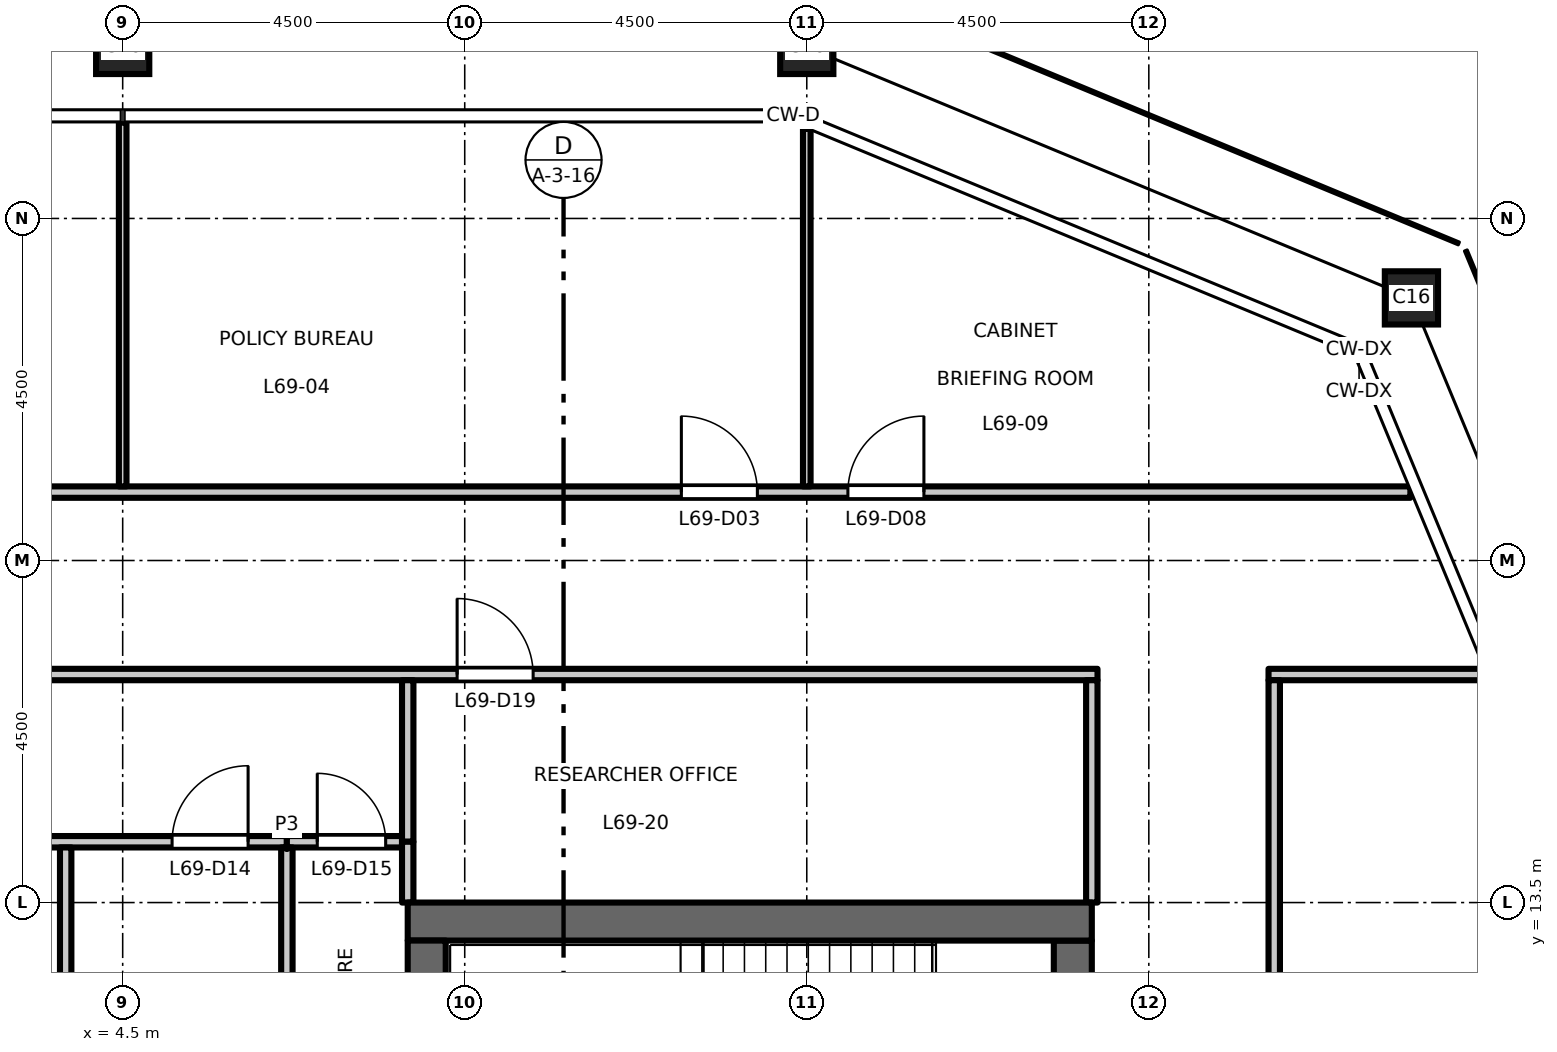
"""IFC4 building model, lengths in metres.
Left out: names, types, materials, properties, quantities, classifications, styles, units other than length and angle.
Written with IfcOpenShell. Run it as: python <this file> out.ifc"""

import sys

from ifc_helpers import new_model, si_unit, direction, frame, frame_2d, origin, origin_2d, place, context, subcontext, project, spatial, rectangle, hollow_rectangle, extrude, element, fill, save


model = new_model("IFC4")
c1 = context("Model", 3, precision=1e-05, world=origin(), true_north=direction((0.0, 1.0)))
c2 = subcontext(c1, "Body", "Model", "MODEL_VIEW")
j1 = project(units=[si_unit("LENGTHUNIT", "METRE"), si_unit("PLANEANGLEUNIT", "RADIAN")], contexts=[c1])
p1 = place(None, origin())
s1 = spatial("IfcSite", under=j1, at=p1, CompositionType="ELEMENT")
p2 = place(p1, origin())
s2 = spatial("IfcBuilding", under=s1, at=p2, CompositionType="ELEMENT")
p3 = place(p2, frame((0.0, 0.0, 321.2)))
s3 = spatial("IfcBuildingStorey", under=s2, at=p3, CompositionType="ELEMENT", Elevation=321.2)
for number, where, z_axis, x_axis in (
    (1, (21.455, 21.455, 0.0), (0.0, 0.0, 1.0), (1.0, 0.0, 0.0)),
    (2, (13.5, 24.75, 0.0), (0.0, 0.0, 1.0), (1.0, 0.0, 0.0)),
    (3, (4.5, 24.75, 0.0), (0.0, 0.0, 1.0), (1.0, 0.0, 0.0)),
):
    element("IfcColumn", number, at=place(p3, frame(where, z_axis=z_axis, x_axis=x_axis)), inside=s3, PredefinedType="COLUMN", context=c2, shape_type="SweptSolid", body=[
        extrude(hollow_rectangle(XDim=0.7, YDim=0.7, WallThickness=0.036, at=origin_2d()), origin(), (0.0, 0.0, 1.0), 4.5),
    ])
p4 = place(p3, frame((17.0, -13.0, 0.0), z_axis=(0.0, 0.0, 1.0), x_axis=(0.0, 1.0, 0.0)))
e4 = element("IfcWall", 4, at=p4, inside=s3, PredefinedType="SHEAR", context=c2, shape_type="SweptSolid", body=[
    extrude(rectangle(XDim=26.0, YDim=0.5, at=frame_2d((13.0, 0.0))), origin(), (0.0, 0.0, 1.0), 4.35),
])
p5 = place(p4, frame((16.825, 0.0, 0.0)))
e5 = element("IfcOpeningElement", 5, at=p5, cuts=e4, PredefinedType="OPENING", context=c2, shape_type="SweptSolid", body=[
    extrude(rectangle(XDim=1.8, YDim=2.1, at=frame_2d((0.9, 1.05))), frame((0.0, 0.26, 0.0), z_axis=(0.0, -1.0, 0.0), x_axis=(1.0, 0.0, 0.0)), (0.0, 0.0, 1.0), 0.52),
])
p6 = place(p4, frame((7.375, 0.0, 0.0)))
e6 = element("IfcOpeningElement", 6, at=p6, cuts=e4, PredefinedType="OPENING", context=c2, shape_type="SweptSolid", body=[
    extrude(rectangle(XDim=1.8, YDim=2.1, at=frame_2d((0.9, 1.05))), frame((0.0, 0.26, 0.0), z_axis=(0.0, -1.0, 0.0), x_axis=(1.0, 0.0, 0.0)), (0.0, 0.0, 1.0), 0.52),
])
p7 = place(p3, frame((8.25, 13.25, 0.0), z_axis=(0.0, 0.0, 1.0), x_axis=(1.0, 0.0, 0.0)))
e7 = element("IfcWall", 7, at=p7, inside=s3, PredefinedType="SHEAR", context=c2, shape_type="SweptSolid", body=[
    extrude(rectangle(XDim=9.0, YDim=0.5, at=frame_2d((4.5, 0.0))), origin(), (0.0, 0.0, 1.0), 4.35),
])
p8 = place(p3, frame((8.5, -13.0, 0.0), z_axis=(0.0, 0.0, 1.0), x_axis=(0.0, 1.0, 0.0)))
e8 = element("IfcWall", 8, at=p8, inside=s3, PredefinedType="SHEAR", context=c2, shape_type="SweptSolid", body=[
    extrude(rectangle(XDim=26.0, YDim=0.5, at=frame_2d((13.0, 0.0))), origin(), (0.0, 0.0, 1.0), 4.35),
])
p9 = place(p3, frame((-8.175, 14.3, 0.0), z_axis=(0.0, 0.0, 1.0), x_axis=(1.0, 0.0, 0.0)))
e9 = element("IfcWall", 9, at=p9, inside=s3, PredefinedType="PARTITIONING", context=c2, shape_type="SweptSolid", body=[
    extrude(rectangle(XDim=14.835, YDim=0.15, at=frame_2d((7.417, 0.0))), origin(), (0.0, 0.0, 1.0), 4.35),
])
p10 = place(p9, frame((4.325, 0.0, 0.0)))
e10 = element("IfcOpeningElement", 10, at=p10, cuts=e9, PredefinedType="OPENING", context=c2, shape_type="SweptSolid", body=[
    extrude(rectangle(XDim=1.0, YDim=2.1, at=frame_2d((0.5, 1.05))), frame((0.0, 0.085, 0.0), z_axis=(0.0, -1.0, 0.0), x_axis=(1.0, 0.0, 0.0)), (0.0, 0.0, 1.0), 0.17),
])
p11 = place(p9, frame((6.575, 0.0, 0.0)))
e11 = element("IfcOpeningElement", 11, at=p11, cuts=e9, PredefinedType="OPENING", context=c2, shape_type="SweptSolid", body=[
    extrude(rectangle(XDim=1.0, YDim=2.1, at=frame_2d((0.5, 1.05))), frame((0.0, 0.085, 0.0), z_axis=(0.0, -1.0, 0.0), x_axis=(1.0, 0.0, 0.0)), (0.0, 0.0, 1.0), 0.17),
])
p12 = place(p9, frame((13.325, 0.0, 0.0)))
e12 = element("IfcOpeningElement", 12, at=p12, cuts=e9, PredefinedType="OPENING", context=c2, shape_type="SweptSolid", body=[
    extrude(rectangle(XDim=1.0, YDim=2.1, at=frame_2d((0.5, 1.05))), frame((0.0, 0.085, 0.0), z_axis=(0.0, -1.0, 0.0), x_axis=(1.0, 0.0, 0.0)), (0.0, 0.0, 1.0), 0.17),
])
p13 = place(p3, frame((6.66, 14.3, 0.0), z_axis=(0.0, 0.0, 1.0), x_axis=(1.0, 0.0, 0.0)))
e13 = element("IfcWall", 13, at=p13, inside=s3, PredefinedType="PARTITIONING", context=c2, shape_type="SweptSolid", body=[
    extrude(rectangle(XDim=1.515, YDim=0.15, at=frame_2d((0.758, 0.0))), origin(), (0.0, 0.0, 1.0), 4.35),
])
p14 = place(p13, frame((0.4, 0.0, 0.0)))
e14 = element("IfcOpeningElement", 14, at=p14, cuts=e13, PredefinedType="OPENING", context=c2, shape_type="SweptSolid", body=[
    extrude(rectangle(XDim=0.9, YDim=2.1, at=frame_2d((0.45, 1.05))), frame((0.0, 0.085, 0.0), z_axis=(0.0, -1.0, 0.0), x_axis=(1.0, 0.0, 0.0)), (0.0, 0.0, 1.0), 0.17),
])
p15 = place(p3, frame((-17.325, 16.5, 0.0), z_axis=(0.0, 0.0, 1.0), x_axis=(1.0, 0.0, 0.0)))
e15 = element("IfcWall", 15, at=p15, inside=s3, PredefinedType="PARTITIONING", context=c2, shape_type="SweptSolid", body=[
    extrude(rectangle(XDim=34.65, YDim=0.15, at=frame_2d((17.325, 0.0))), origin(), (0.0, 0.0, 1.0), 4.35),
])
p16 = place(p15, frame((9.725, 0.0, 0.0)))
e16 = element("IfcOpeningElement", 16, at=p16, cuts=e15, PredefinedType="OPENING", context=c2, shape_type="SweptSolid", body=[
    extrude(rectangle(XDim=1.0, YDim=2.1, at=frame_2d((0.5, 1.05))), frame((0.0, 0.085, 0.0), z_axis=(0.0, -1.0, 0.0), x_axis=(1.0, 0.0, 0.0)), (0.0, 0.0, 1.0), 0.17),
])
p17 = place(p15, frame((7.475, 0.0, 0.0)))
e17 = element("IfcOpeningElement", 17, at=p17, cuts=e15, PredefinedType="OPENING", context=c2, shape_type="SweptSolid", body=[
    extrude(rectangle(XDim=1.0, YDim=2.1, at=frame_2d((0.5, 1.05))), frame((0.0, 0.085, 0.0), z_axis=(0.0, -1.0, 0.0), x_axis=(1.0, 0.0, 0.0)), (0.0, 0.0, 1.0), 0.17),
])
p18 = place(p15, frame((26.225, 0.0, 0.0)))
e18 = element("IfcOpeningElement", 18, at=p18, cuts=e15, PredefinedType="OPENING", context=c2, shape_type="SweptSolid", body=[
    extrude(rectangle(XDim=1.0, YDim=2.1, at=frame_2d((0.5, 1.05))), frame((0.0, 0.085, 0.0), z_axis=(0.0, -1.0, 0.0), x_axis=(1.0, 0.0, 0.0)), (0.0, 0.0, 1.0), 0.17),
])
p19 = place(p3, frame((19.575, 16.5, 0.0), z_axis=(0.0, 0.0, 1.0), x_axis=(1.0, 0.0, 0.0)))
e19 = element("IfcWall", 19, at=p19, inside=s3, PredefinedType="PARTITIONING", context=c2, shape_type="SweptSolid", body=[
    extrude(rectangle(XDim=2.861, YDim=0.15, at=frame_2d((1.431, 0.0))), origin(), (0.0, 0.0, 1.0), 4.35),
])
p20 = place(p3, frame((-21.441, 18.9, 0.0), z_axis=(0.0, 0.0, 1.0), x_axis=(1.0, 0.0, 0.0)))
e20 = element("IfcWall", 20, at=p20, inside=s3, PredefinedType="PARTITIONING", context=c2, shape_type="SweptSolid", body=[
    extrude(rectangle(XDim=42.882, YDim=0.15, at=frame_2d((21.441, 0.0))), origin(), (0.0, 0.0, 1.0), 4.35),
])
p21 = place(p20, frame((15.291, 0.0, 0.0)))
e21 = element("IfcOpeningElement", 21, at=p21, cuts=e20, PredefinedType="OPENING", context=c2, shape_type="SweptSolid", body=[
    extrude(rectangle(XDim=1.0, YDim=2.1, at=frame_2d((0.5, 1.05))), frame((0.0, 0.085, 0.0), z_axis=(0.0, -1.0, 0.0), x_axis=(1.0, 0.0, 0.0)), (0.0, 0.0, 1.0), 0.17),
])
p22 = place(p20, frame((17.541, 0.0, 0.0)))
e22 = element("IfcOpeningElement", 22, at=p22, cuts=e20, PredefinedType="OPENING", context=c2, shape_type="SweptSolid", body=[
    extrude(rectangle(XDim=1.0, YDim=2.1, at=frame_2d((0.5, 1.05))), frame((0.0, 0.085, 0.0), z_axis=(0.0, -1.0, 0.0), x_axis=(1.0, 0.0, 0.0)), (0.0, 0.0, 1.0), 0.17),
])
p23 = place(p20, frame((33.291, 0.0, 0.0)))
e23 = element("IfcOpeningElement", 23, at=p23, cuts=e20, PredefinedType="OPENING", context=c2, shape_type="SweptSolid", body=[
    extrude(rectangle(XDim=1.0, YDim=2.1, at=frame_2d((0.5, 1.05))), frame((0.0, 0.085, 0.0), z_axis=(0.0, -1.0, 0.0), x_axis=(1.0, 0.0, 0.0)), (0.0, 0.0, 1.0), 0.17),
])
p24 = place(p20, frame((6.291, 0.0, 0.0)))
e24 = element("IfcOpeningElement", 24, at=p24, cuts=e20, PredefinedType="OPENING", context=c2, shape_type="SweptSolid", body=[
    extrude(rectangle(XDim=1.0, YDim=2.1, at=frame_2d((0.5, 1.05))), frame((0.0, 0.085, 0.0), z_axis=(0.0, -1.0, 0.0), x_axis=(1.0, 0.0, 0.0)), (0.0, 0.0, 1.0), 0.17),
])
p25 = place(p20, frame((35.482, 0.0, 0.0)))
e25 = element("IfcOpeningElement", 25, at=p25, cuts=e20, PredefinedType="OPENING", context=c2, shape_type="SweptSolid", body=[
    extrude(rectangle(XDim=1.0, YDim=2.1, at=frame_2d((0.5, 1.05))), frame((0.0, 0.085, 0.0), z_axis=(0.0, -1.0, 0.0), x_axis=(1.0, 0.0, 0.0)), (0.0, 0.0, 1.0), 0.17),
])
p26 = place(p3, frame((3.75, 8.37, 0.0), z_axis=(0.0, 0.0, 1.0), x_axis=(0.0, 1.0, 0.0)))
e26 = element("IfcWall", 26, at=p26, inside=s3, PredefinedType="PARTITIONING", context=c2, shape_type="SweptSolid", body=[
    extrude(rectangle(XDim=5.855, YDim=0.15, at=frame_2d((2.927, 0.0))), origin(), (0.0, 0.0, 1.0), 4.35),
])
p27 = place(p3, frame((4.5, 18.975, 0.0), z_axis=(0.0, 0.0, 1.0), x_axis=(0.0, 1.0, 0.0)))
e27 = element("IfcWall", 27, at=p27, inside=s3, PredefinedType="PARTITIONING", context=c2, shape_type="SweptSolid", body=[
    extrude(rectangle(XDim=4.785, YDim=0.1, at=frame_2d((2.393, 0.0))), origin(), (0.0, 0.0, 1.0), 3.65),
])
p28 = place(p3, frame((6.66, 8.127, 0.0), z_axis=(0.0, 0.0, 1.0), x_axis=(0.0, 1.0, 0.0)))
e28 = element("IfcWall", 28, at=p28, inside=s3, PredefinedType="PARTITIONING", context=c2, shape_type="SweptSolid", body=[
    extrude(rectangle(XDim=6.098, YDim=0.15, at=frame_2d((3.049, 0.0))), origin(), (0.0, 0.0, 1.0), 4.35),
])
p29 = place(p3, frame((8.25, 14.3, 0.0), z_axis=(0.0, 0.0, 1.0), x_axis=(0.0, 1.0, 0.0)))
e29 = element("IfcWall", 29, at=p29, inside=s3, PredefinedType="PARTITIONING", context=c2, shape_type="SweptSolid", body=[
    extrude(rectangle(XDim=2.125, YDim=0.15, at=frame_2d((1.062, 0.0))), origin(), (0.0, 0.0, 1.0), 4.35),
])
p30 = place(p3, frame((8.25, 13.5, 0.0), z_axis=(0.0, 0.0, 1.0), x_axis=(0.0, 1.0, 0.0)))
e30 = element("IfcWall", 30, at=p30, inside=s3, PredefinedType="PARTITIONING", context=c2, shape_type="SweptSolid", body=[
    extrude(rectangle(XDim=0.8, YDim=0.15, at=frame_2d((0.4, 0.0))), origin(), (0.0, 0.0, 1.0), 4.35),
])
p31 = place(p3, frame((13.5, 18.975, 0.0), z_axis=(0.0, 0.0, 1.0), x_axis=(0.0, 1.0, 0.0)))
e31 = element("IfcWall", 31, at=p31, inside=s3, PredefinedType="PARTITIONING", context=c2, shape_type="SweptSolid", body=[
    extrude(rectangle(XDim=4.703, YDim=0.1, at=frame_2d((2.352, 0.0))), origin(), (0.0, 0.0, 1.0), 3.75),
])
p32 = place(p3, frame((17.25, 13.5, 0.0), z_axis=(0.0, 0.0, 1.0), x_axis=(0.0, 1.0, 0.0)))
e32 = element("IfcWall", 32, at=p32, inside=s3, PredefinedType="PARTITIONING", context=c2, shape_type="SweptSolid", body=[
    extrude(rectangle(XDim=2.925, YDim=0.15, at=frame_2d((1.462, 0.0))), origin(), (0.0, 0.0, 1.0), 4.35),
])
p33 = place(p3, frame((19.65, -16.425, 0.0), z_axis=(0.0, 0.0, 1.0), x_axis=(0.0, 1.0, 0.0)))
e33 = element("IfcWall", 33, at=p33, inside=s3, PredefinedType="PARTITIONING", context=c2, shape_type="SweptSolid", body=[
    extrude(rectangle(XDim=32.85, YDim=0.15, at=frame_2d((16.425, 0.0))), origin(), (0.0, 0.0, 1.0), 4.35),
])
p34 = place(p33, frame((0.575, 0.0, 0.0)))
e34 = element("IfcOpeningElement", 34, at=p34, cuts=e33, PredefinedType="OPENING", context=c2, shape_type="SweptSolid", body=[
    extrude(rectangle(XDim=1.0, YDim=2.1, at=frame_2d((0.5, 1.05))), frame((0.0, 0.085, 0.0), z_axis=(0.0, -1.0, 0.0), x_axis=(1.0, 0.0, 0.0)), (0.0, 0.0, 1.0), 0.17),
])
p35 = place(p23, origin())
e35 = element("IfcDoor", 35, at=p35, inside=s3, OperationType="SINGLE_SWING_LEFT", PredefinedType="DOOR", context=c2, shape_type="SweptSolid", body=[
    extrude(rectangle(XDim=1.0, YDim=2.1, at=frame_2d((0.5, 1.05))), frame((0.0, 0.025, 0.0), z_axis=(0.0, -1.0, 0.0), x_axis=(1.0, 0.0, 0.0)), (0.0, 0.0, 1.0), 0.05),
])
fill(e23, e35)
p36 = place(p25, origin())
e36 = element("IfcDoor", 36, at=p36, inside=s3, OperationType="SINGLE_SWING_RIGHT", PredefinedType="DOOR", context=c2, shape_type="SweptSolid", body=[
    extrude(rectangle(XDim=1.0, YDim=2.1, at=frame_2d((0.5, 1.05))), frame((0.0, 0.025, 0.0), z_axis=(0.0, -1.0, 0.0), x_axis=(1.0, 0.0, 0.0)), (0.0, 0.0, 1.0), 0.05),
])
fill(e25, e36)
p37 = place(p12, origin())
e37 = element("IfcDoor", 37, at=p37, inside=s3, OperationType="SINGLE_SWING_RIGHT", PredefinedType="DOOR", context=c2, shape_type="SweptSolid", body=[
    extrude(rectangle(XDim=1.0, YDim=2.1, at=frame_2d((0.5, 1.05))), frame((0.0, 0.025, 0.0), z_axis=(0.0, -1.0, 0.0), x_axis=(1.0, 0.0, 0.0)), (0.0, 0.0, 1.0), 0.05),
])
fill(e12, e37)
p38 = place(p14, origin())
e38 = element("IfcDoor", 38, at=p38, inside=s3, OperationType="SINGLE_SWING_LEFT", PredefinedType="DOOR", context=c2, shape_type="SweptSolid", body=[
    extrude(rectangle(XDim=0.9, YDim=2.1, at=frame_2d((0.45, 1.05))), frame((0.0, 0.025, 0.0), z_axis=(0.0, -1.0, 0.0), x_axis=(1.0, 0.0, 0.0)), (0.0, 0.0, 1.0), 0.05),
])
fill(e14, e38)
p39 = place(p18, origin())
e39 = element("IfcDoor", 39, at=p39, inside=s3, OperationType="SINGLE_SWING_LEFT", PredefinedType="DOOR", context=c2, shape_type="SweptSolid", body=[
    extrude(rectangle(XDim=1.0, YDim=2.1, at=frame_2d((0.5, 1.05))), frame((0.0, 0.025, 0.0), z_axis=(0.0, -1.0, 0.0), x_axis=(1.0, 0.0, 0.0)), (0.0, 0.0, 1.0), 0.05),
])
fill(e18, e39)
save(model, sys.argv[1])
